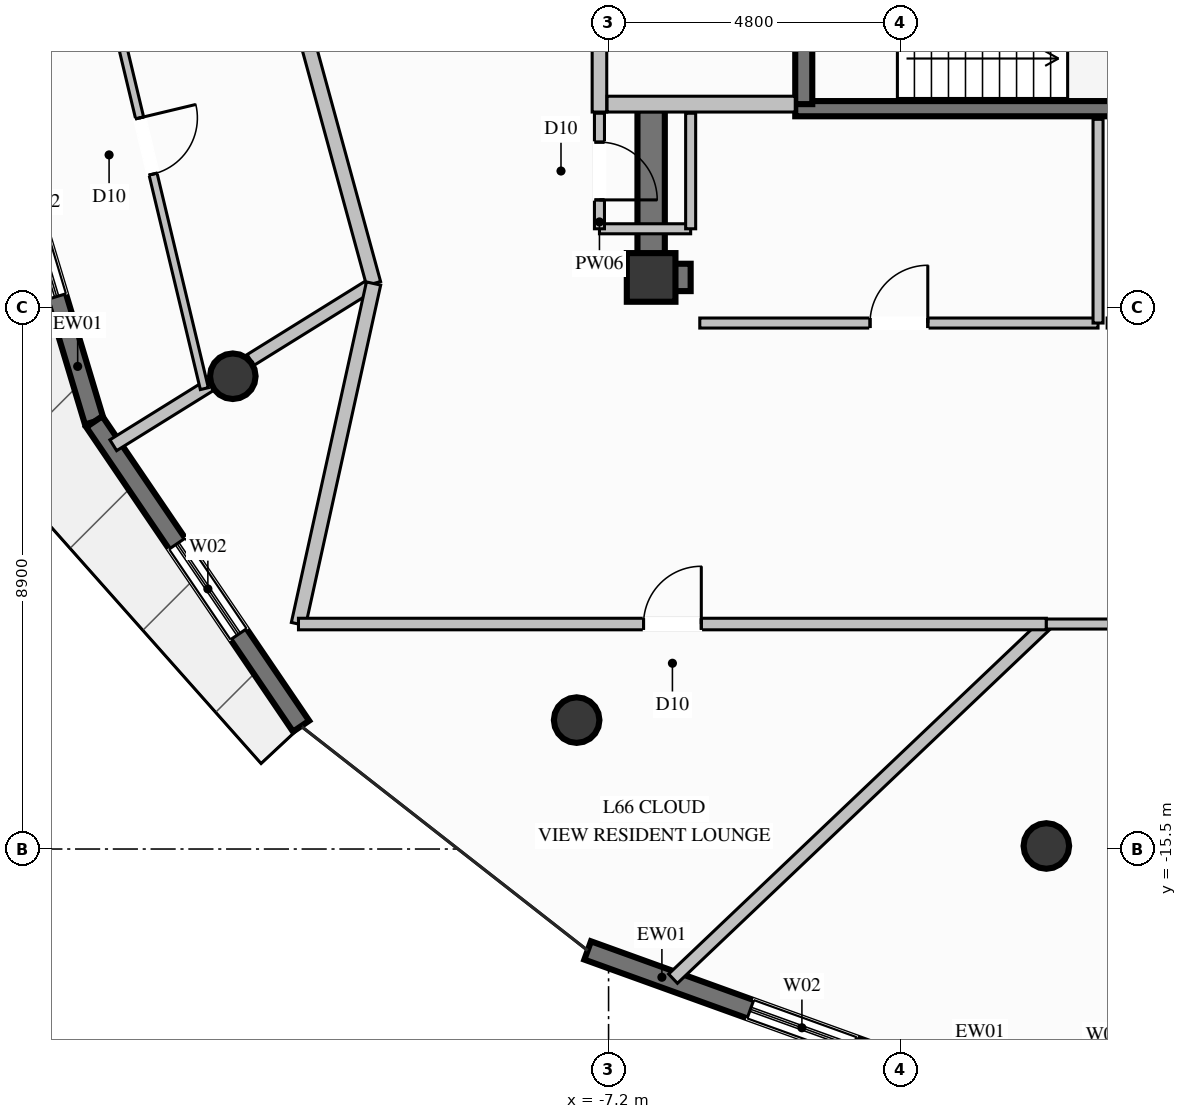
"""IFC4 building model, lengths in metres.
Left out: names, types, materials, properties, quantities, classifications, styles, units other than length and angle.
Written with IfcOpenShell. Run it as: python <this file> out.ifc"""

import sys

from ifc_helpers import new_model, si_unit, direction, frame, frame_2d, origin, origin_2d, place, context, subcontext, project, spatial, rectangle, circle, extrude, element, fill, save


model = new_model("IFC4")
c1 = context("Model", 3, precision=1e-05, world=origin(), true_north=direction((0.0, 1.0)))
c2 = subcontext(c1, "Body", "Model", "MODEL_VIEW")
j1 = project(units=[si_unit("LENGTHUNIT", "METRE"), si_unit("PLANEANGLEUNIT", "RADIAN")], contexts=[c1])
p1 = place(None, origin())
s1 = spatial("IfcSite", under=j1, at=p1, CompositionType="ELEMENT")
p2 = place(p1, origin())
s2 = spatial("IfcBuilding", under=s1, at=p2, CompositionType="ELEMENT")
p3 = place(p2, frame((0.0, 0.0, 254.4)))
s3 = spatial("IfcBuildingStorey", under=s2, at=p3, CompositionType="ELEMENT", Elevation=254.4)
p4 = place(p3, frame((-6.5, -6.1, 0.0), z_axis=(0.0, 0.0, 1.0), x_axis=(1.0, 0.0, 0.0)))
e1 = element("IfcColumn", 1, at=p4, inside=s3, PredefinedType="COLUMN", context=c2, shape_type="SweptSolid", body=[
    extrude(rectangle(XDim=0.8, YDim=0.8, at=origin_2d()), origin(), (0.0, 0.0, 1.0), 3.8),
])
p5 = place(p3, frame((-4.13, -3.325, 0.0), z_axis=(0.0, 0.0, 1.0), x_axis=(1.0, 0.0, 0.0)))
e2 = element("IfcWall", 2, at=p5, inside=s3, PredefinedType="SOLIDWALL", context=c2, shape_type="SweptSolid", body=[
    extrude(rectangle(XDim=8.26, YDim=0.25, at=frame_2d((4.13, 0.0))), origin(), (0.0, 0.0, 1.0), 3.8),
])
p6 = place(p3, frame((-6.275, -6.1, 0.0), z_axis=(0.0, 0.0, 1.0), x_axis=(1.0, 0.0, 0.0)))
e3 = element("IfcWall", 3, at=p6, inside=s3, PredefinedType="SHEAR", context=c2, shape_type="SweptSolid", body=[
    extrude(rectangle(XDim=0.425, YDim=0.45, at=frame_2d((0.212, 0.0))), origin(), (0.0, 0.0, 1.0), 3.8),
])
p7 = place(p3, frame((-6.5, -6.325, 0.0), z_axis=(0.0, 0.0, 1.0), x_axis=(0.0, 1.0, 0.0)))
e4 = element("IfcWall", 4, at=p7, inside=s3, PredefinedType="SHEAR", context=c2, shape_type="SweptSolid", body=[
    extrude(rectangle(XDim=2.975, YDim=0.45, at=frame_2d((1.487, 0.0))), origin(), (0.0, 0.0, 1.0), 3.8),
])
for number, where, z_axis, x_axis in (
    (5, (-13.38, -7.725, 0.0), (0.0, 0.0, 1.0), (1.0, 0.0, 0.0)),
    (6, (-7.725, -13.38, 0.0), (0.0, 0.0, 1.0), (1.0, 0.0, 0.0)),
    (7, (0.0, -15.45, 0.0), (0.0, 0.0, 1.0), (1.0, 0.0, 0.0)),
):
    element("IfcColumn", number, at=place(p3, frame(where, z_axis=z_axis, x_axis=x_axis)), inside=s3, PredefinedType="COLUMN", context=c2, shape_type="SweptSolid", body=[
        extrude(circle(Radius=0.375, at=origin_2d()), origin(), (0.0, 0.0, 1.0), 3.8),
    ])
p8 = place(p3, frame((-15.658, -8.472, 0.0), z_axis=(0.0, 0.0, 1.0), x_axis=(-0.288104770088, 0.957598893824, 0.0)))
e8 = element("IfcWall", 8, at=p8, inside=s3, PredefinedType="SOLIDWALL", context=c2, shape_type="SweptSolid", body=[
    extrude(rectangle(XDim=6.095, YDim=0.32, at=frame_2d((3.048, 0.0))), origin(), (0.0, 0.0, 1.0), 3.57),
])
p9 = place(p8, frame((2.148, 0.0, 0.35)))
e9 = element("IfcOpeningElement", 9, at=p9, cuts=e8, PredefinedType="OPENING", context=c2, shape_type="SweptSolid", body=[
    extrude(rectangle(XDim=1.8, YDim=2.6, at=frame_2d((0.9, 1.3))), frame((0.0, 0.17, 0.0), z_axis=(0.0, -1.0, 0.0), x_axis=(1.0, 0.0, 0.0)), (0.0, 0.0, 1.0), 0.34),
])
p10 = place(p3, frame((-12.257, -13.48, 0.0), z_axis=(0.0, 0.0, 1.0), x_axis=(-0.561790347822, 0.827279641412, 0.0)))
e10 = element("IfcWall", 10, at=p10, inside=s3, PredefinedType="SOLIDWALL", context=c2, shape_type="SweptSolid", body=[
    extrude(rectangle(XDim=6.054, YDim=0.32, at=frame_2d((3.027, 0.0))), origin(), (0.0, 0.0, 1.0), 3.57),
])
p11 = place(p10, frame((1.829, 0.0, 0.35)))
e11 = element("IfcOpeningElement", 11, at=p11, cuts=e10, PredefinedType="OPENING", context=c2, shape_type="SweptSolid", body=[
    extrude(rectangle(XDim=1.8, YDim=2.6, at=frame_2d((0.9, 1.3))), frame((0.0, 0.17, 0.0), z_axis=(0.0, -1.0, 0.0), x_axis=(1.0, 0.0, 0.0)), (0.0, 0.0, 1.0), 0.34),
])
p12 = place(p3, frame((-1.98, -19.176, 0.0), z_axis=(0.0, 0.0, 1.0), x_axis=(-0.940616145843, 0.339472040349, 0.0)))
e12 = element("IfcWall", 12, at=p12, inside=s3, PredefinedType="SOLIDWALL", context=c2, shape_type="SweptSolid", body=[
    extrude(rectangle(XDim=5.915, YDim=0.32, at=frame_2d((2.958, 0.0))), origin(), (0.0, 0.0, 1.0), 3.57),
])
p13 = place(p12, frame((1.269, 0.0, 0.35)))
e13 = element("IfcOpeningElement", 13, at=p13, cuts=e12, PredefinedType="OPENING", context=c2, shape_type="SweptSolid", body=[
    extrude(rectangle(XDim=1.8, YDim=2.6, at=frame_2d((0.9, 1.3))), frame((0.0, 0.17, 0.0), z_axis=(0.0, -1.0, 0.0), x_axis=(1.0, 0.0, 0.0)), (0.0, 0.0, 1.0), 0.34),
])
p14 = place(p3, frame((-3.99, -3.25, 0.0), z_axis=(0.0, 0.0, 1.0), x_axis=(0.0, 1.0, 0.0)))
e14 = element("IfcWall", 14, at=p14, inside=s3, PredefinedType="SOLIDWALL", context=c2, shape_type="SweptSolid", body=[
    extrude(rectangle(XDim=5.46, YDim=0.28, at=frame_2d((2.73, 0.0))), origin(), (0.0, 0.0, 1.0), 3.57),
])
p15 = place(p14, frame((0.937, 0.0, 0.0)))
e15 = element("IfcOpeningElement", 15, at=p15, cuts=e14, PredefinedType="OPENING", context=c2, shape_type="SweptSolid", body=[
    extrude(rectangle(XDim=1.2, YDim=2.2, at=frame_2d((0.6, 1.1))), frame((0.0, 0.15, 0.0), z_axis=(0.0, -1.0, 0.0), x_axis=(1.0, 0.0, 0.0)), (0.0, 0.0, 1.0), 0.3),
])
p16 = place(p3, frame((-7.35, -3.38, 0.0), z_axis=(0.0, 0.0, 1.0), x_axis=(0.0, 1.0, 0.0)))
e16 = element("IfcWall", 16, at=p16, inside=s3, PredefinedType="PARTITIONING", context=c2, shape_type="SweptSolid", body=[
    extrude(rectangle(XDim=5.72, YDim=0.24, at=frame_2d((2.86, 0.0))), origin(), (0.0, 0.0, 1.0), 2.655),
])
p17 = place(p16, frame((1.599, 0.0, 0.0)))
e17 = element("IfcOpeningElement", 17, at=p17, cuts=e16, PredefinedType="OPENING", context=c2, shape_type="SweptSolid", body=[
    extrude(rectangle(XDim=1.15, YDim=2.2, at=frame_2d((0.575, 1.1))), frame((0.0, 0.13, 0.0), z_axis=(0.0, -1.0, 0.0), x_axis=(1.0, 0.0, 0.0)), (0.0, 0.0, 1.0), 0.26),
])
p18 = place(p3, frame((-7.225, -3.25, 0.0), z_axis=(0.0, 0.0, 1.0), x_axis=(1.0, 0.0, 0.0)))
e18 = element("IfcWall", 18, at=p18, inside=s3, PredefinedType="PARTITIONING", context=c2, shape_type="SweptSolid", body=[
    extrude(rectangle(XDim=3.095, YDim=0.26, at=frame_2d((1.548, 0.0))), origin(), (0.0, 0.0, 1.0), 3.57),
])
p19 = place(p3, frame((-7.35, -5.3, 0.0), z_axis=(0.0, 0.0, 1.0), x_axis=(1.0, 0.0, 0.0)))
e19 = element("IfcWall", 19, at=p19, inside=s3, PredefinedType="PARTITIONING", context=c2, shape_type="SweptSolid", body=[
    extrude(rectangle(XDim=1.5, YDim=0.165, at=frame_2d((0.75, 0.0))), origin(), (0.0, 0.0, 1.0), 2.655),
])
p20 = place(p3, frame((-5.85, -5.3, 0.0), z_axis=(0.0, 0.0, 1.0), x_axis=(0.0, 1.0, 0.0)))
e20 = element("IfcWall", 20, at=p20, inside=s3, PredefinedType="PARTITIONING", context=c2, shape_type="SweptSolid", body=[
    extrude(rectangle(XDim=1.9, YDim=0.165, at=frame_2d((0.95, 0.0))), origin(), (0.0, 0.0, 1.0), 2.655),
])
p21 = place(p3, frame((-7.35, -3.4, 0.0), z_axis=(0.0, 0.0, 1.0), x_axis=(0.0, -1.0, 0.0)))
e21 = element("IfcWall", 21, at=p21, inside=s3, PredefinedType="PARTITIONING", context=c2, shape_type="SweptSolid", body=[
    extrude(rectangle(XDim=1.9, YDim=0.165, at=frame_2d((0.95, 0.0))), origin(), (0.0, 0.0, 1.0), 3.57),
])
p22 = place(p21, frame((0.475, 0.0, 0.0)))
e22 = element("IfcOpeningElement", 22, at=p22, cuts=e21, PredefinedType="OPENING", context=c2, shape_type="SweptSolid", body=[
    extrude(rectangle(XDim=0.95, YDim=2.1, at=frame_2d((0.475, 1.05))), frame((0.0, 0.093, 0.0), z_axis=(0.0, -1.0, 0.0), x_axis=(1.0, 0.0, 0.0)), (0.0, 0.0, 1.0), 0.185),
])
p23 = place(p3, frame((-5.7, -6.85, 0.0), z_axis=(0.0, 0.0, 1.0), x_axis=(1.0, 0.0, 0.0)))
e23 = element("IfcWall", 23, at=p23, inside=s3, PredefinedType="PARTITIONING", context=c2, shape_type="SweptSolid", body=[
    extrude(rectangle(XDim=6.55, YDim=0.165, at=frame_2d((3.275, 0.0))), origin(), (0.0, 0.0, 1.0), 2.655),
])
p24 = place(p23, frame((2.8, 0.0, 0.0)))
e24 = element("IfcOpeningElement", 24, at=p24, cuts=e23, PredefinedType="OPENING", context=c2, shape_type="SweptSolid", body=[
    extrude(rectangle(XDim=0.95, YDim=2.1, at=frame_2d((0.475, 1.05))), frame((0.0, 0.093, 0.0), z_axis=(0.0, -1.0, 0.0), x_axis=(1.0, 0.0, 0.0)), (0.0, 0.0, 1.0), 0.185),
])
p25 = place(p3, frame((0.85, -6.85, 0.0), z_axis=(0.0, 0.0, 1.0), x_axis=(0.0, 1.0, 0.0)))
e25 = element("IfcWall", 25, at=p25, inside=s3, PredefinedType="PARTITIONING", context=c2, shape_type="SweptSolid", body=[
    extrude(rectangle(XDim=3.35, YDim=0.165, at=frame_2d((1.675, 0.0))), origin(), (0.0, 0.0, 1.0), 3.57),
])
p26 = place(p3, frame((-11.065, -6.2, 0.0), z_axis=(0.0, 0.0, 1.0), x_axis=(-0.849325046487, -0.527870216445, 0.0)))
e26 = element("IfcWall", 26, at=p26, inside=s3, PredefinedType="PARTITIONING", context=c2, shape_type="SweptSolid", body=[
    extrude(rectangle(XDim=2.383, YDim=0.21, at=frame_2d((1.192, 0.0))), origin(), (0.0, 0.0, 1.0), 3.011),
])
p27 = place(p3, frame((-13.748, -7.867, 0.0), z_axis=(0.0, 0.0, 1.0), x_axis=(-0.849315201444, -0.527886056451, 0.0)))
e27 = element("IfcWall", 27, at=p27, inside=s3, PredefinedType="PARTITIONING", context=c2, shape_type="SweptSolid", body=[
    extrude(rectangle(XDim=1.881, YDim=0.21, at=frame_2d((0.941, 0.0))), origin(), (0.0, 0.0, 1.0), 3.57),
])
p28 = place(p3, frame((-12.8, 0.15, 0.0), z_axis=(0.0, 0.0, 1.0), x_axis=(0.263588113382, -0.964635323054, 0.0)))
e28 = element("IfcWall", 28, at=p28, inside=s3, PredefinedType="PARTITIONING", context=c2, shape_type="SweptSolid", body=[
    extrude(rectangle(XDim=6.583, YDim=0.24, at=frame_2d((3.292, 0.0))), origin(), (0.0, 0.0, 1.0), 3.57),
])
p29 = place(p3, frame((-15.756, 0.052, 0.0), z_axis=(0.0, 0.0, 1.0), x_axis=(0.232540176205, -0.972586791217, 0.0)))
e29 = element("IfcWall", 29, at=p29, inside=s3, PredefinedType="PARTITIONING", context=c2, shape_type="SweptSolid", body=[
    extrude(rectangle(XDim=8.206, YDim=0.135, at=frame_2d((4.103, 0.0))), origin(), (0.0, 0.0, 1.0), 3.138),
])
p30 = place(p29, frame((3.628, 0.0, 0.0)))
e30 = element("IfcOpeningElement", 30, at=p30, cuts=e29, PredefinedType="OPENING", context=c2, shape_type="SweptSolid", body=[
    extrude(rectangle(XDim=0.95, YDim=2.1, at=frame_2d((0.475, 1.05))), frame((0.0, 0.078, 0.0), z_axis=(0.0, -1.0, 0.0), x_axis=(1.0, 0.0, 0.0)), (0.0, 0.0, 1.0), 0.155),
])
p31 = place(p3, frame((0.0, -11.8, 0.0), z_axis=(0.0, 0.0, 1.0), x_axis=(-0.725050537947, -0.688695663862, 0.0)))
e31 = element("IfcWall", 31, at=p31, inside=s3, PredefinedType="PARTITIONING", context=c2, shape_type="SweptSolid", body=[
    extrude(rectangle(XDim=8.468, YDim=0.21, at=frame_2d((4.234, 0.0))), origin(), (0.0, 0.0, 1.0), 3.57),
])
p32 = place(p3, frame((-11.065, -6.2, 0.0), z_axis=(0.0, 0.0, 1.0), x_axis=(-0.215375028734, -0.976531411168, 0.0)))
e32 = element("IfcWall", 32, at=p32, inside=s3, PredefinedType="PARTITIONING", context=c2, shape_type="SweptSolid", body=[
    extrude(rectangle(XDim=5.735, YDim=0.24, at=frame_2d((2.867, 0.0))), origin(), (0.0, 0.0, 1.0), 3.57),
])
p33 = place(p3, frame((-12.3, -11.8, 0.0), z_axis=(0.0, 0.0, 1.0), x_axis=(1.0, 0.0, 0.0)))
e33 = element("IfcWall", 33, at=p33, inside=s3, PredefinedType="PARTITIONING", context=c2, shape_type="SweptSolid", body=[
    extrude(rectangle(XDim=12.3, YDim=0.19, at=frame_2d((6.15, 0.0))), origin(), (0.0, 0.0, 1.0), 3.57),
])
p34 = place(p33, frame((5.675, 0.0, 0.0)))
e34 = element("IfcOpeningElement", 34, at=p34, cuts=e33, PredefinedType="OPENING", context=c2, shape_type="SweptSolid", body=[
    extrude(rectangle(XDim=0.95, YDim=2.1, at=frame_2d((0.475, 1.05))), frame((0.0, 0.105, 0.0), z_axis=(0.0, -1.0, 0.0), x_axis=(1.0, 0.0, 0.0)), (0.0, 0.0, 1.0), 0.21),
])
p35 = place(p3, frame((0.0, -11.8, 0.0), z_axis=(0.0, 0.0, 1.0), x_axis=(1.0, 0.0, 0.0)))
e35 = element("IfcWall", 35, at=p35, inside=s3, PredefinedType="PARTITIONING", context=c2, shape_type="SweptSolid", body=[
    extrude(rectangle(XDim=12.3, YDim=0.165, at=frame_2d((6.15, 0.0))), origin(), (0.0, 0.0, 1.0), 3.57),
])
p36 = place(p35, frame((5.675, 0.0, 0.0)))
e36 = element("IfcOpeningElement", 36, at=p36, cuts=e35, PredefinedType="OPENING", context=c2, shape_type="SweptSolid", body=[
    extrude(rectangle(XDim=0.95, YDim=2.1, at=frame_2d((0.475, 1.05))), frame((0.0, 0.093, 0.0), z_axis=(0.0, -1.0, 0.0), x_axis=(1.0, 0.0, 0.0)), (0.0, 0.0, 1.0), 0.185),
])
p37 = place(p9, origin())
e37 = element("IfcWindow", 37, at=p37, inside=s3, PartitioningType="SINGLE_PANEL", PredefinedType="WINDOW", context=c2, shape_type="SweptSolid", body=[
    extrude(rectangle(XDim=1.8, YDim=2.6, at=frame_2d((0.9, 1.3))), frame((0.0, 0.03, 0.0), z_axis=(0.0, -1.0, 0.0), x_axis=(1.0, 0.0, 0.0)), (0.0, 0.0, 1.0), 0.06),
])
fill(e9, e37)
p38 = place(p11, origin())
e38 = element("IfcWindow", 38, at=p38, inside=s3, PartitioningType="SINGLE_PANEL", PredefinedType="WINDOW", context=c2, shape_type="SweptSolid", body=[
    extrude(rectangle(XDim=1.8, YDim=2.6, at=frame_2d((0.9, 1.3))), frame((0.0, 0.03, 0.0), z_axis=(0.0, -1.0, 0.0), x_axis=(1.0, 0.0, 0.0)), (0.0, 0.0, 1.0), 0.06),
])
fill(e11, e38)
p39 = place(p13, origin())
e39 = element("IfcWindow", 39, at=p39, inside=s3, PartitioningType="SINGLE_PANEL", PredefinedType="WINDOW", context=c2, shape_type="SweptSolid", body=[
    extrude(rectangle(XDim=1.8, YDim=2.6, at=frame_2d((0.9, 1.3))), frame((0.0, 0.03, 0.0), z_axis=(0.0, -1.0, 0.0), x_axis=(1.0, 0.0, 0.0)), (0.0, 0.0, 1.0), 0.06),
])
fill(e13, e39)
p40 = place(p22, origin())
e40 = element("IfcDoor", 40, at=p40, inside=s3, OperationType="SINGLE_SWING_RIGHT", PredefinedType="DOOR", context=c2, shape_type="SweptSolid", body=[
    extrude(rectangle(XDim=0.95, YDim=2.1, at=frame_2d((0.475, 1.05))), frame((0.0, 0.025, 0.0), z_axis=(0.0, -1.0, 0.0), x_axis=(1.0, 0.0, 0.0)), (0.0, 0.0, 1.0), 0.05),
])
fill(e22, e40)
p41 = place(p24, origin())
e41 = element("IfcDoor", 41, at=p41, inside=s3, OperationType="SINGLE_SWING_RIGHT", PredefinedType="DOOR", context=c2, shape_type="SweptSolid", body=[
    extrude(rectangle(XDim=0.95, YDim=2.1, at=frame_2d((0.475, 1.05))), frame((0.0, 0.025, 0.0), z_axis=(0.0, -1.0, 0.0), x_axis=(1.0, 0.0, 0.0)), (0.0, 0.0, 1.0), 0.05),
])
fill(e24, e41)
p42 = place(p30, origin())
e42 = element("IfcDoor", 42, at=p42, inside=s3, OperationType="SINGLE_SWING_LEFT", PredefinedType="DOOR", context=c2, shape_type="SweptSolid", body=[
    extrude(rectangle(XDim=0.95, YDim=2.1, at=frame_2d((0.475, 1.05))), frame((0.0, 0.025, 0.0), z_axis=(0.0, -1.0, 0.0), x_axis=(1.0, 0.0, 0.0)), (0.0, 0.0, 1.0), 0.05),
])
fill(e30, e42)
p43 = place(p34, origin())
e43 = element("IfcDoor", 43, at=p43, inside=s3, OperationType="SINGLE_SWING_RIGHT", PredefinedType="DOOR", context=c2, shape_type="SweptSolid", body=[
    extrude(rectangle(XDim=0.95, YDim=2.1, at=frame_2d((0.475, 1.05))), frame((0.0, 0.025, 0.0), z_axis=(0.0, -1.0, 0.0), x_axis=(1.0, 0.0, 0.0)), (0.0, 0.0, 1.0), 0.05),
])
fill(e34, e43)
save(model, sys.argv[1])
